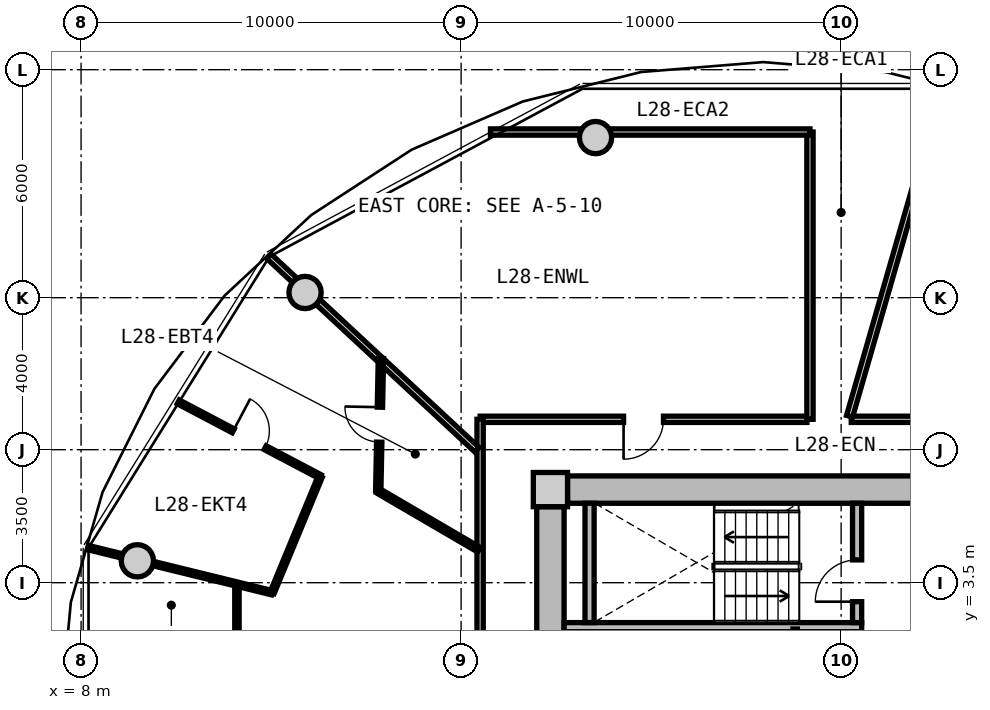
"""IFC4 building model, lengths in metres.
Left out: names, types, materials, properties, quantities, classifications, styles, units other than length and angle.
Written with IfcOpenShell. Run it as: python <this file> out.ifc"""

import sys

from ifc_helpers import new_model, si_unit, direction, frame, frame_2d, origin, origin_2d, place, context, subcontext, project, spatial, rectangle, circle, extrude, source, transform, mapped, element, fill, save


model = new_model("IFC4")
c1 = context("Model", 3, precision=1e-05, world=origin(), true_north=direction((0.0, 1.0)))
c2 = subcontext(c1, "Body", "Model", "MODEL_VIEW")
j1 = project(units=[si_unit("LENGTHUNIT", "METRE"), si_unit("PLANEANGLEUNIT", "RADIAN")], contexts=[c1])
p1 = place(None, origin())
s1 = spatial("IfcSite", under=j1, at=p1, CompositionType="ELEMENT")
p2 = place(p1, origin())
s2 = spatial("IfcBuilding", under=s1, at=p2, CompositionType="ELEMENT")
p3 = place(p2, frame((0.0, 0.0, 93.2)))
s3 = spatial("IfcBuildingStorey", under=s2, at=p3, CompositionType="ELEMENT", Elevation=93.2)
m1 = source(origin(), c2, "Body", "SweptSolid", [
    extrude(rectangle(XDim=0.9, YDim=0.9, at=origin_2d()), origin(), (0.0, 0.0, 1.0), 3.05),
])
p4 = place(p3, frame((20.35, 5.95, 0.0), z_axis=(0.0, 0.0, 1.0), x_axis=(1.0, 0.0, 0.0)))
e1 = element("IfcColumn", 1, at=p4, inside=s3, PredefinedType="COLUMN", context=c2, shape_type="MappedRepresentation", body=[
    mapped(m1, transform((0.0, 0.0, 0.0), x_axis=(1.0, 0.0, 0.0), y_axis=(0.0, 1.0, 0.0), z_axis=(0.0, 0.0, 1.0), scale=1.0)),
])
m2 = source(origin(), c2, "Body", "SweptSolid", [
    extrude(rectangle(XDim=14.4, YDim=0.72, at=frame_2d((7.2, 0.0))), origin(), (0.0, 0.0, 1.0), 2.79),
])
p5 = place(p3, frame((20.8, 5.95, 0.0), z_axis=(0.0, 0.0, 1.0), x_axis=(1.0, 0.0, 0.0)))
e2 = element("IfcWall", 2, at=p5, inside=s3, PredefinedType="SHEAR", context=c2, shape_type="MappedRepresentation", body=[
    mapped(m2, transform((0.0, 0.0, 0.0), x_axis=(1.0, 0.0, 0.0), y_axis=(0.0, 1.0, 0.0), z_axis=(0.0, 0.0, 1.0), scale=1.0)),
])
m3 = source(origin(), c2, "Body", "SweptSolid", [
    extrude(rectangle(XDim=11.0, YDim=0.72, at=frame_2d((5.5, 0.0))), origin(), (0.0, 0.0, 1.0), 2.79),
])
p6 = place(p3, frame((20.35, -5.5, 0.0), z_axis=(0.0, 0.0, 1.0), x_axis=(0.0, 1.0, 0.0)))
e3 = element("IfcWall", 3, at=p6, inside=s3, PredefinedType="SHEAR", context=c2, shape_type="MappedRepresentation", body=[
    mapped(m3, transform((0.0, 0.0, 0.0), x_axis=(1.0, 0.0, 0.0), y_axis=(0.0, 1.0, 0.0), z_axis=(0.0, 0.0, 1.0), scale=1.0)),
])
p7 = place(p6, frame((3.8, 0.0, 0.0)))
e4 = element("IfcOpeningElement", 4, at=p7, cuts=e3, PredefinedType="OPENING", context=c2, shape_type="SweptSolid", body=[
    extrude(rectangle(XDim=1.2, YDim=2.15, at=frame_2d((0.6, 1.075))), frame((0.0, 0.37, 0.0), z_axis=(0.0, -1.0, 0.0), x_axis=(1.0, 0.0, 0.0)), (0.0, 0.0, 1.0), 0.74),
])
m4 = source(origin(), c2, "Body", "SweptSolid", [
    extrude(circle(Radius=0.425, at=origin_2d()), origin(), (0.0, 0.0, 1.0), 3.05),
])
for number, where, z_axis, x_axis in (
    (5, (21.537, 15.213, 0.0), (0.0, 0.0, 1.0), (1.0, 0.0, 0.0)),
    (6, (13.894, 11.137, 0.0), (0.0, 0.0, 1.0), (1.0, 0.0, 0.0)),
    (7, (9.481, 4.076, 0.0), (0.0, 0.0, 1.0), (1.0, 0.0, 0.0)),
):
    element("IfcColumn", number, at=place(p3, frame(where, z_axis=z_axis, x_axis=x_axis)), inside=s3, PredefinedType="COLUMN", context=c2, shape_type="MappedRepresentation", body=[
        mapped(m4, transform((0.0, 0.0, 0.0), x_axis=(1.0, 0.0, 0.0), y_axis=(0.0, 1.0, 0.0), z_axis=(0.0, 0.0, 1.0), scale=1.0)),
    ])
m5 = source(origin(), c2, "Body", "SweptSolid", [
    extrude(rectangle(XDim=7.83, YDim=0.24, at=frame_2d((3.915, 0.0))), origin(), (0.0, 0.0, 1.0), 2.79),
])
p8 = place(p3, frame((20.71, 2.33, 0.0), z_axis=(0.0, 0.0, 1.0), x_axis=(1.0, 0.0, 0.0)))
e8 = element("IfcWall", 8, at=p8, inside=s3, PredefinedType="PARTITIONING", context=c2, shape_type="MappedRepresentation", body=[
    mapped(m5, transform((0.0, 0.0, 0.0), x_axis=(1.0, 0.0, 0.0), y_axis=(0.0, 1.0, 0.0), z_axis=(0.0, 0.0, 1.0), scale=1.0)),
])
m6 = source(origin(), c2, "Body", "SweptSolid", [
    extrude(rectangle(XDim=3.14, YDim=0.24, at=frame_2d((1.57, 0.0))), origin(), (0.0, 0.0, 1.0), 2.79),
])
p9 = place(p3, frame((21.38, 2.45, 0.0), z_axis=(0.0, 0.0, 1.0), x_axis=(0.0, 1.0, 0.0)))
e9 = element("IfcWall", 9, at=p9, inside=s3, PredefinedType="PARTITIONING", context=c2, shape_type="MappedRepresentation", body=[
    mapped(m6, transform((0.0, 0.0, 0.0), x_axis=(1.0, 0.0, 0.0), y_axis=(0.0, 1.0, 0.0), z_axis=(0.0, 0.0, 1.0), scale=1.0)),
])
p10 = place(p3, frame((28.42, 2.45, 0.0), z_axis=(0.0, 0.0, 1.0), x_axis=(0.0, 1.0, 0.0)))
e10 = element("IfcWall", 10, at=p10, inside=s3, PredefinedType="PARTITIONING", context=c2, shape_type="MappedRepresentation", body=[
    mapped(m6, transform((0.0, 0.0, 0.0), x_axis=(1.0, 0.0, 0.0), y_axis=(0.0, 1.0, 0.0), z_axis=(0.0, 0.0, 1.0), scale=1.0)),
])
p11 = place(p10, frame((0.55, 0.0, 0.0)))
e11 = element("IfcOpeningElement", 11, at=p11, cuts=e10, PredefinedType="OPENING", context=c2, shape_type="SweptSolid", body=[
    extrude(rectangle(XDim=1.1, YDim=2.15, at=frame_2d((0.55, 1.075))), frame((0.0, 0.13, 0.0), z_axis=(0.0, -1.0, 0.0), x_axis=(1.0, 0.0, 0.0)), (0.0, 0.0, 1.0), 0.26),
])
m7 = source(origin(), c2, "Body", "SweptSolid", [
    extrude(rectangle(XDim=2.33, YDim=0.115, at=frame_2d((1.165, 0.0))), origin(), (0.0, 0.0, 1.0), 2.775),
])
p12 = place(p3, frame((26.79, -0.05, 0.0), z_axis=(0.0, 0.0, 1.0), x_axis=(0.0, 1.0, 0.0)))
e12 = element("IfcWall", 12, at=p12, inside=s3, PredefinedType="PARTITIONING", context=c2, shape_type="MappedRepresentation", body=[
    mapped(m7, transform((0.0, 0.0, 0.0), x_axis=(1.0, 0.0, 0.0), y_axis=(0.0, 1.0, 0.0), z_axis=(0.0, 0.0, 1.0), scale=1.0)),
])
m8 = source(origin(), c2, "Body", "SweptSolid", [
    extrude(rectangle(XDim=8.6, YDim=0.165, at=frame_2d((4.3, 0.0))), origin(), (0.0, 0.0, 1.0), 2.775),
])
p13 = place(p3, frame((18.5, 7.8, 0.0), z_axis=(0.0, 0.0, 1.0), x_axis=(1.0, 0.0, 0.0)))
e13 = element("IfcWall", 13, at=p13, inside=s3, PredefinedType="PARTITIONING", context=c2, shape_type="MappedRepresentation", body=[
    mapped(m8, transform((0.0, 0.0, 0.0), x_axis=(1.0, 0.0, 0.0), y_axis=(0.0, 1.0, 0.0), z_axis=(0.0, 0.0, 1.0), scale=1.0)),
])
p14 = place(p13, frame((3.775, 0.0, 0.0)))
e14 = element("IfcOpeningElement", 14, at=p14, cuts=e13, PredefinedType="OPENING", context=c2, shape_type="SweptSolid", body=[
    extrude(rectangle(XDim=1.05, YDim=2.15, at=frame_2d((0.525, 1.075))), frame((0.0, 0.093, 0.0), z_axis=(0.0, -1.0, 0.0), x_axis=(1.0, 0.0, 0.0)), (0.0, 0.0, 1.0), 0.185),
])
m9 = source(origin(), c2, "Body", "SweptSolid", [
    extrude(rectangle(XDim=9.234, YDim=0.165, at=frame_2d((4.617, 0.0))), origin(), (0.0, 0.0, 1.0), 2.775),
])
p15 = place(p3, frame((28.266, 7.8, 0.0), z_axis=(0.0, 0.0, 1.0), x_axis=(1.0, 0.0, 0.0)))
e15 = element("IfcWall", 15, at=p15, inside=s3, PredefinedType="PARTITIONING", context=c2, shape_type="MappedRepresentation", body=[
    mapped(m9, transform((0.0, 0.0, 0.0), x_axis=(1.0, 0.0, 0.0), y_axis=(0.0, 1.0, 0.0), z_axis=(0.0, 0.0, 1.0), scale=1.0)),
])
p16 = place(p15, frame((4.092, 0.0, 0.0)))
e16 = element("IfcOpeningElement", 16, at=p16, cuts=e15, PredefinedType="OPENING", context=c2, shape_type="SweptSolid", body=[
    extrude(rectangle(XDim=1.05, YDim=2.15, at=frame_2d((0.525, 1.075))), frame((0.0, 0.093, 0.0), z_axis=(0.0, -1.0, 0.0), x_axis=(1.0, 0.0, 0.0)), (0.0, 0.0, 1.0), 0.185),
])
m10 = source(origin(), c2, "Body", "SweptSolid", [
    extrude(rectangle(XDim=15.6, YDim=0.165, at=frame_2d((7.8, 0.0))), origin(), (0.0, 0.0, 1.0), 2.775),
])
p17 = place(p3, frame((18.5, -7.8, 0.0), z_axis=(0.0, 0.0, 1.0), x_axis=(0.0, 1.0, 0.0)))
e17 = element("IfcWall", 17, at=p17, inside=s3, PredefinedType="PARTITIONING", context=c2, shape_type="MappedRepresentation", body=[
    mapped(m10, transform((0.0, 0.0, 0.0), x_axis=(1.0, 0.0, 0.0), y_axis=(0.0, 1.0, 0.0), z_axis=(0.0, 0.0, 1.0), scale=1.0)),
])
p18 = place(p17, frame((5.673, 0.0, 0.0)))
e18 = element("IfcOpeningElement", 18, at=p18, cuts=e17, PredefinedType="OPENING", context=c2, shape_type="SweptSolid", body=[
    extrude(rectangle(XDim=1.05, YDim=2.15, at=frame_2d((0.525, 1.075))), frame((0.0, 0.093, 0.0), z_axis=(0.0, -1.0, 0.0), x_axis=(1.0, 0.0, 0.0)), (0.0, 0.0, 1.0), 0.185),
])
m11 = source(origin(), c2, "Body", "SweptSolid", [
    extrude(rectangle(XDim=8.989, YDim=0.165, at=frame_2d((4.495, 0.0))), origin(), (0.0, 0.0, 1.0), 2.275),
])
p19 = place(p3, frame((28.222, 7.88, 0.0), z_axis=(0.0, 0.0, 1.0), x_axis=(0.27702323008, 0.960863221274, 0.0)))
e19 = element("IfcWall", 19, at=p19, inside=s3, PredefinedType="PARTITIONING", context=c2, shape_type="MappedRepresentation", body=[
    mapped(m11, transform((0.0, 0.0, 0.0), x_axis=(1.0, 0.0, 0.0), y_axis=(0.0, 1.0, 0.0), z_axis=(0.0, 0.0, 1.0), scale=1.0)),
])
m12 = source(origin(), c2, "Body", "SweptSolid", [
    extrude(rectangle(XDim=7.482, YDim=0.165, at=frame_2d((3.741, 0.0))), origin(), (0.0, 0.0, 1.0), 2.275),
])
p20 = place(p3, frame((18.42, 6.998, 0.0), z_axis=(0.0, 0.0, 1.0), x_axis=(-0.732508698043, 0.680757671489, 0.0)))
e20 = element("IfcWall", 20, at=p20, inside=s3, PredefinedType="PARTITIONING", context=c2, shape_type="MappedRepresentation", body=[
    mapped(m12, transform((0.0, 0.0, 0.0), x_axis=(1.0, 0.0, 0.0), y_axis=(0.0, 1.0, 0.0), z_axis=(0.0, 0.0, 1.0), scale=1.0)),
])
m13 = source(origin(), c2, "Body", "SweptSolid", [
    extrude(rectangle(XDim=7.56, YDim=0.165, at=frame_2d((3.78, 0.0))), origin(), (0.0, 0.0, 1.0), 2.775),
])
p21 = place(p3, frame((27.18, 7.8, 0.0), z_axis=(0.0, 0.0, 1.0), x_axis=(0.0, 1.0, 0.0)))
e21 = element("IfcWall", 21, at=p21, inside=s3, PredefinedType="PARTITIONING", context=c2, shape_type="MappedRepresentation", body=[
    mapped(m13, transform((0.0, 0.0, 0.0), x_axis=(1.0, 0.0, 0.0), y_axis=(0.0, 1.0, 0.0), z_axis=(0.0, 0.0, 1.0), scale=1.0)),
])
m14 = source(origin(), c2, "Body", "SweptSolid", [
    extrude(rectangle(XDim=8.407, YDim=0.165, at=frame_2d((4.204, 0.0))), origin(), (0.0, 0.0, 1.0), 2.275),
])
p22 = place(p3, frame((18.773, 15.36, 0.0), z_axis=(0.0, 0.0, 1.0), x_axis=(1.0, 0.0, 0.0)))
e22 = element("IfcWall", 22, at=p22, inside=s3, PredefinedType="PARTITIONING", context=c2, shape_type="MappedRepresentation", body=[
    mapped(m14, transform((0.0, 0.0, 0.0), x_axis=(1.0, 0.0, 0.0), y_axis=(0.0, 1.0, 0.0), z_axis=(0.0, 0.0, 1.0), scale=1.0)),
])
m15 = source(origin(), c2, "Body", "SweptSolid", [
    extrude(rectangle(XDim=6.935, YDim=0.115, at=frame_2d((3.468, 0.0))), origin(), (0.0, 0.0, 1.0), 2.775),
])
p23 = place(p3, frame((12.101, 3.468, 0.0), z_axis=(0.0, 0.0, 1.0), x_axis=(0.0, -1.0, 0.0)))
e23 = element("IfcWall", 23, at=p23, inside=s3, PredefinedType="PARTITIONING", context=c2, shape_type="MappedRepresentation", body=[
    mapped(m15, transform((0.0, 0.0, 0.0), x_axis=(1.0, 0.0, 0.0), y_axis=(0.0, 1.0, 0.0), z_axis=(0.0, 0.0, 1.0), scale=1.0)),
])
p24 = place(p23, frame((2.993, 0.0, 0.0)))
e24 = element("IfcOpeningElement", 24, at=p24, cuts=e23, PredefinedType="OPENING", context=c2, shape_type="SweptSolid", body=[
    extrude(rectangle(XDim=0.95, YDim=2.1, at=frame_2d((0.475, 1.05))), frame((0.0, 0.067, 0.0), z_axis=(0.0, -1.0, 0.0), x_axis=(1.0, 0.0, 0.0)), (0.0, 0.0, 1.0), 0.135),
])
m16 = source(origin(), c2, "Body", "SweptSolid", [
    extrude(rectangle(XDim=4.992, YDim=0.115, at=frame_2d((2.496, 0.0))), origin(), (0.0, 0.0, 1.0), 2.275),
])
p25 = place(p3, frame((13.026, 3.236, 0.0), z_axis=(0.0, 0.0, 1.0), x_axis=(-0.971191841847, 0.238298985162, 0.0)))
e25 = element("IfcWall", 25, at=p25, inside=s3, PredefinedType="PARTITIONING", context=c2, shape_type="MappedRepresentation", body=[
    mapped(m16, transform((0.0, 0.0, 0.0), x_axis=(1.0, 0.0, 0.0), y_axis=(0.0, 1.0, 0.0), z_axis=(0.0, 0.0, 1.0), scale=1.0)),
])
m17 = source(origin(), c2, "Body", "SweptSolid", [
    extrude(rectangle(XDim=3.069, YDim=0.14, at=frame_2d((1.535, 0.0))), origin(), (0.0, 0.0, 1.0), 2.775),
])
p26 = place(p3, frame((18.47, 4.368, 0.0), z_axis=(0.0, 0.0, 1.0), x_axis=(-0.863524911282, 0.504306184371, 0.0)))
e26 = element("IfcWall", 26, at=p26, inside=s3, PredefinedType="PARTITIONING", context=c2, shape_type="MappedRepresentation", body=[
    mapped(m17, transform((0.0, 0.0, 0.0), x_axis=(1.0, 0.0, 0.0), y_axis=(0.0, 1.0, 0.0), z_axis=(0.0, 0.0, 1.0), scale=1.0)),
])
m18 = source(origin(), c2, "Body", "SweptSolid", [
    extrude(rectangle(XDim=3.487, YDim=0.14, at=frame_2d((1.743, 0.0))), origin(), (0.0, 0.0, 1.0), 2.775),
])
p27 = place(p3, frame((15.82, 5.916, 0.0), z_axis=(0.0, 0.0, 1.0), x_axis=(0.020026799331, 0.999799443543, 0.0)))
e27 = element("IfcWall", 27, at=p27, inside=s3, PredefinedType="PARTITIONING", context=c2, shape_type="MappedRepresentation", body=[
    mapped(m18, transform((0.0, 0.0, 0.0), x_axis=(1.0, 0.0, 0.0), y_axis=(0.0, 1.0, 0.0), z_axis=(0.0, 0.0, 1.0), scale=1.0)),
])
p28 = place(p27, frame((1.283, 0.0, 0.0)))
e28 = element("IfcOpeningElement", 28, at=p28, cuts=e27, PredefinedType="OPENING", context=c2, shape_type="SweptSolid", body=[
    extrude(rectangle(XDim=0.92, YDim=2.1, at=frame_2d((0.46, 1.05))), frame((0.0, 0.08, 0.0), z_axis=(0.0, -1.0, 0.0), x_axis=(1.0, 0.0, 0.0)), (0.0, 0.0, 1.0), 0.16),
])
m19 = source(origin(), c2, "Body", "SweptSolid", [
    extrude(rectangle(XDim=4.221, YDim=0.115, at=frame_2d((2.11, 0.0))), origin(), (0.0, 0.0, 1.0), 2.775),
])
p29 = place(p3, frame((14.292, 6.29, 0.0), z_axis=(0.0, 0.0, 1.0), x_axis=(-0.88458298465, 0.466382829087, 0.0)))
e29 = element("IfcWall", 29, at=p29, inside=s3, PredefinedType="PARTITIONING", context=c2, shape_type="MappedRepresentation", body=[
    mapped(m19, transform((0.0, 0.0, 0.0), x_axis=(1.0, 0.0, 0.0), y_axis=(0.0, 1.0, 0.0), z_axis=(0.0, 0.0, 1.0), scale=1.0)),
])
p30 = place(p29, frame((1.635, 0.0, 0.0)))
e30 = element("IfcOpeningElement", 30, at=p30, cuts=e29, PredefinedType="OPENING", context=c2, shape_type="SweptSolid", body=[
    extrude(rectangle(XDim=0.95, YDim=2.1, at=frame_2d((0.475, 1.05))), frame((0.0, 0.067, 0.0), z_axis=(0.0, -1.0, 0.0), x_axis=(1.0, 0.0, 0.0)), (0.0, 0.0, 1.0), 0.135),
])
m20 = source(origin(), c2, "Body", "SweptSolid", [
    extrude(rectangle(XDim=3.306, YDim=0.115, at=frame_2d((1.653, 0.0))), origin(), (0.0, 0.0, 1.0), 2.775),
])
p31 = place(p3, frame((14.292, 6.29, 0.0), z_axis=(0.0, 0.0, 1.0), x_axis=(-0.382506175075, -0.923952934965, 0.0)))
e31 = element("IfcWall", 31, at=p31, inside=s3, PredefinedType="PARTITIONING", context=c2, shape_type="MappedRepresentation", body=[
    mapped(m20, transform((0.0, 0.0, 0.0), x_axis=(1.0, 0.0, 0.0), y_axis=(0.0, 1.0, 0.0), z_axis=(0.0, 0.0, 1.0), scale=1.0)),
])
m21 = source(origin(), c2, "Body", "SweptSolid", [
    extrude(rectangle(XDim=1.1, YDim=2.15, at=frame_2d((0.55, 1.075))), frame((0.0, 0.025, 0.0), z_axis=(0.0, -1.0, 0.0), x_axis=(1.0, 0.0, 0.0)), (0.0, 0.0, 1.0), 0.05),
])
p32 = place(p11, origin())
e32 = element("IfcDoor", 32, at=p32, inside=s3, OperationType="SINGLE_SWING_LEFT", PredefinedType="DOOR", context=c2, shape_type="MappedRepresentation", body=[
    mapped(m21, transform((0.0, 0.0, 0.0), x_axis=(1.0, 0.0, 0.0), y_axis=(0.0, 1.0, 0.0), z_axis=(0.0, 0.0, 1.0), scale=1.0)),
])
fill(e11, e32)
m22 = source(origin(), c2, "Body", "SweptSolid", [
    extrude(rectangle(XDim=1.05, YDim=2.15, at=frame_2d((0.525, 1.075))), frame((0.0, 0.025, 0.0), z_axis=(0.0, -1.0, 0.0), x_axis=(1.0, 0.0, 0.0)), (0.0, 0.0, 1.0), 0.05),
])
p33 = place(p14, frame((1.05, 0.0, 0.0), z_axis=(0.0, 0.0, 1.0), x_axis=(-1.0, 0.0, 0.0)))
e33 = element("IfcDoor", 33, at=p33, inside=s3, OperationType="SINGLE_SWING_RIGHT", PredefinedType="DOOR", context=c2, shape_type="MappedRepresentation", body=[
    mapped(m22, transform((0.0, 0.0, 0.0), x_axis=(1.0, 0.0, 0.0), y_axis=(0.0, 1.0, 0.0), z_axis=(0.0, 0.0, 1.0), scale=1.0)),
])
fill(e14, e33)
m23 = source(origin(), c2, "Body", "SweptSolid", [
    extrude(rectangle(XDim=0.92, YDim=2.1, at=frame_2d((0.46, 1.05))), frame((0.0, 0.025, 0.0), z_axis=(0.0, -1.0, 0.0), x_axis=(1.0, 0.0, 0.0)), (0.0, 0.0, 1.0), 0.05),
])
p34 = place(p28, origin())
e34 = element("IfcDoor", 34, at=p34, inside=s3, OperationType="SINGLE_SWING_RIGHT", PredefinedType="DOOR", context=c2, shape_type="MappedRepresentation", body=[
    mapped(m23, transform((0.0, 0.0, 0.0), x_axis=(1.0, 0.0, 0.0), y_axis=(0.0, 1.0, 0.0), z_axis=(0.0, 0.0, 1.0), scale=1.0)),
])
fill(e28, e34)
m24 = source(origin(), c2, "Body", "SweptSolid", [
    extrude(rectangle(XDim=0.95, YDim=2.1, at=frame_2d((0.475, 1.05))), frame((0.0, 0.025, 0.0), z_axis=(0.0, -1.0, 0.0), x_axis=(1.0, 0.0, 0.0)), (0.0, 0.0, 1.0), 0.05),
])
p35 = place(p30, frame((0.95, 0.0, 0.0), z_axis=(0.0, 0.0, 1.0), x_axis=(-1.0, 0.0, 0.0)))
e35 = element("IfcDoor", 35, at=p35, inside=s3, OperationType="SINGLE_SWING_LEFT", PredefinedType="DOOR", context=c2, shape_type="MappedRepresentation", body=[
    mapped(m24, transform((0.0, 0.0, 0.0), x_axis=(1.0, 0.0, 0.0), y_axis=(0.0, 1.0, 0.0), z_axis=(0.0, 0.0, 1.0), scale=1.0)),
])
fill(e30, e35)
save(model, sys.argv[1])
